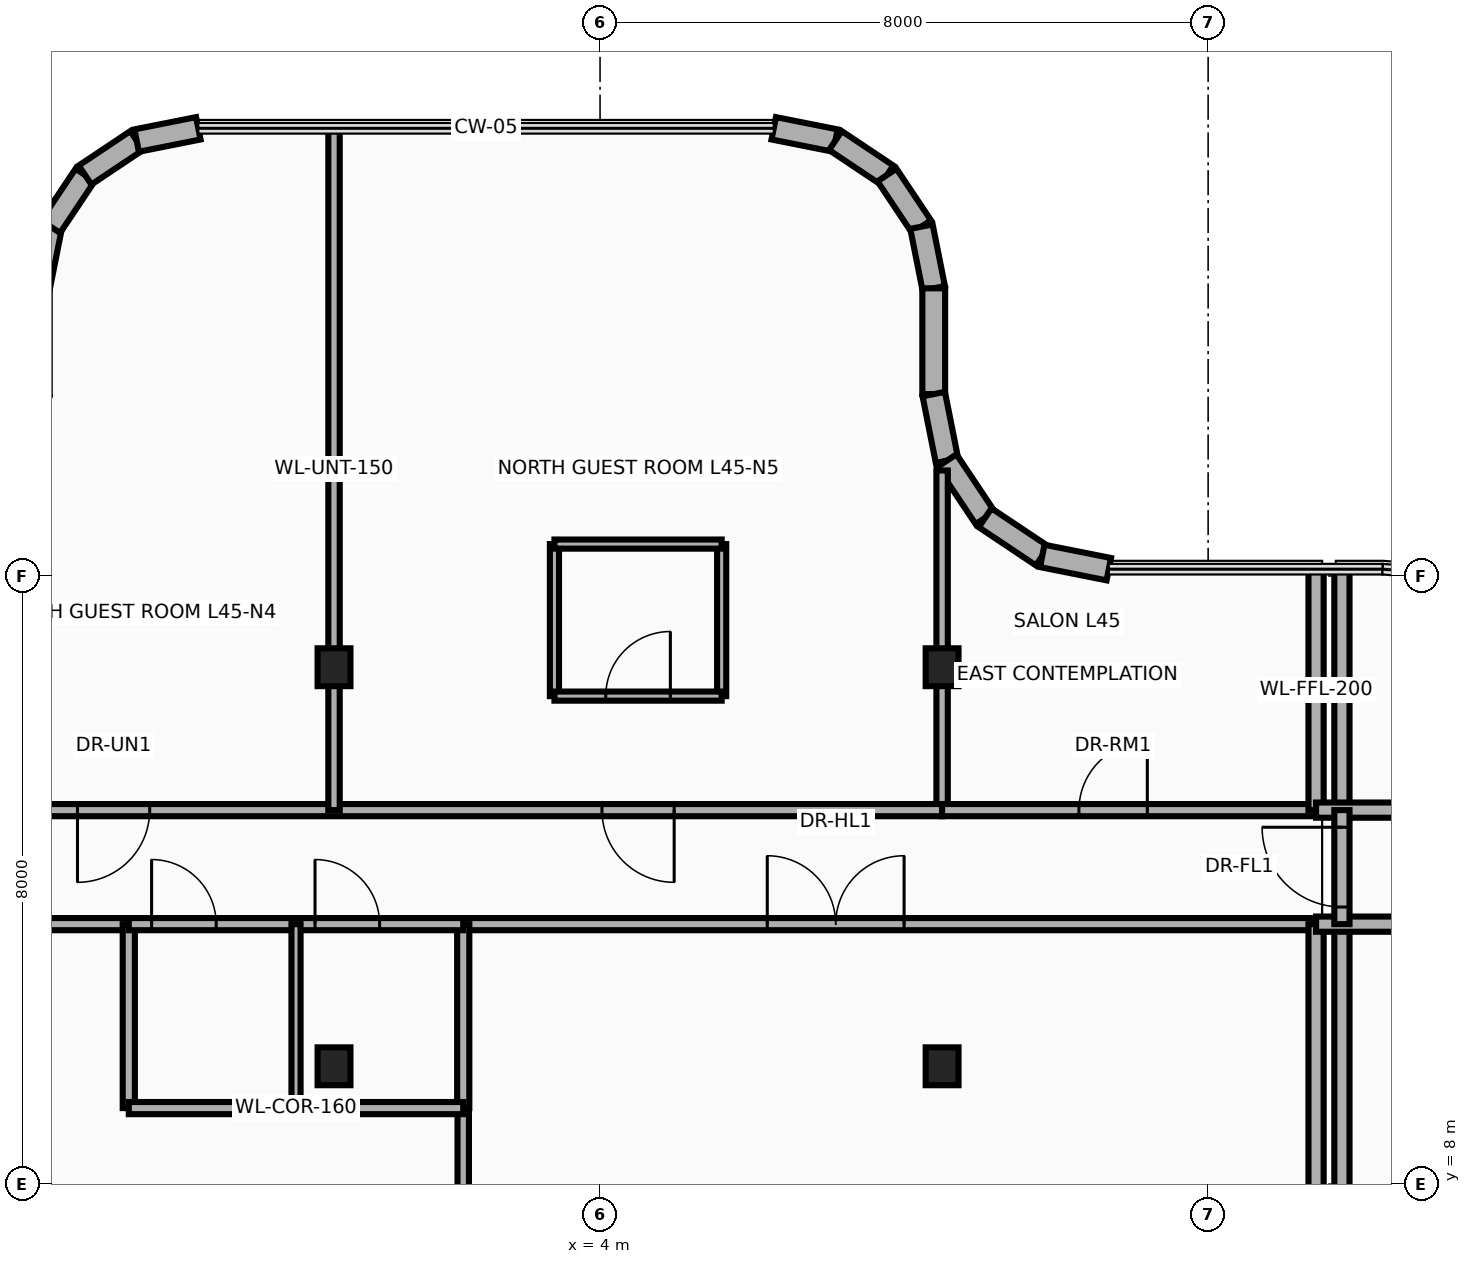
"""IFC4 building model, lengths in metres.
Left out: names, types, materials, properties, quantities, classifications, styles, units other than length and angle.
Written with IfcOpenShell. Run it as: python <this file> out.ifc"""

import sys

from ifc_helpers import new_model, si_unit, direction, frame, frame_2d, origin, origin_2d, place, context, subcontext, project, spatial, rectangle, i_section, extrude, source, transform, mapped, element, fill, save


model = new_model("IFC4")
c1 = context("Model", 3, precision=1e-05, world=origin(), true_north=direction((0.0, 1.0)))
c2 = subcontext(c1, "Body", "Model", "MODEL_VIEW")
j1 = project(units=[si_unit("LENGTHUNIT", "METRE"), si_unit("PLANEANGLEUNIT", "RADIAN")], contexts=[c1])
p1 = place(None, origin())
s1 = spatial("IfcSite", under=j1, at=p1, CompositionType="ELEMENT")
p2 = place(p1, origin())
s2 = spatial("IfcBuilding", under=s1, at=p2, CompositionType="ELEMENT")
p3 = place(p2, frame((0.0, 0.0, 176.55)))
s3 = spatial("IfcBuildingStorey", under=s2, at=p3, CompositionType="ELEMENT", Elevation=176.55)
m1 = source(origin(), c2, "Body", "SweptSolid", [
    extrude(i_section(OverallWidth=0.432, OverallDepth=0.498, WebThickness=0.056, FlangeThickness=0.089, at=origin_2d()), origin(), (0.0, 0.0, 1.0), 3.95),
])
for number, where, z_axis, x_axis in (
    (1, (8.5, 9.55, 0.0), (0.0, 0.0, 1.0), (1.0, 0.0, 0.0)),
    (2, (8.5, 14.8, 0.0), (0.0, 0.0, 1.0), (1.0, 0.0, 0.0)),
    (3, (0.5, 9.55, 0.0), (0.0, 0.0, 1.0), (1.0, 0.0, 0.0)),
    (4, (0.5, 14.8, 0.0), (0.0, 0.0, 1.0), (1.0, 0.0, 0.0)),
):
    element("IfcColumn", number, at=place(p3, frame(where, z_axis=z_axis, x_axis=x_axis)), inside=s3, PredefinedType="COLUMN", context=c2, shape_type="MappedRepresentation", body=[
        mapped(m1, transform((0.0, 0.0, 0.0), x_axis=(1.0, 0.0, 0.0), y_axis=(0.0, 1.0, 0.0), z_axis=(0.0, 0.0, 1.0), scale=1.0)),
    ])
p4 = place(p3, frame((-3.39, 19.785, 0.0), z_axis=(0.0, 0.0, 1.0), x_axis=(0.195094354541, 0.980784478276, 0.0)))
e5 = element("IfcWall", 5, at=p4, inside=s3, PredefinedType="SOLIDWALL", context=c2, shape_type="SweptSolid", body=[
    extrude(rectangle(XDim=0.827, YDim=0.3, at=frame_2d((0.414, 0.0))), origin(), (0.0, 0.0, 1.0), 2.615),
])
p5 = place(p3, frame((-3.229, 20.596, 0.0), z_axis=(0.0, 0.0, 1.0), x_axis=(0.55545926088, 0.831543750805, 0.0)))
e6 = element("IfcWall", 6, at=p5, inside=s3, PredefinedType="SOLIDWALL", context=c2, shape_type="SweptSolid", body=[
    extrude(rectangle(XDim=0.816, YDim=0.3, at=frame_2d((0.408, 0.0))), origin(), (0.0, 0.0, 1.0), 2.615),
])
p6 = place(p3, frame((-2.775, 21.275, 0.0), z_axis=(0.0, 0.0, 1.0), x_axis=(0.831543750805, 0.55545926088, 0.0)))
e7 = element("IfcWall", 7, at=p6, inside=s3, PredefinedType="SOLIDWALL", context=c2, shape_type="SweptSolid", body=[
    extrude(rectangle(XDim=0.816, YDim=0.3, at=frame_2d((0.408, 0.0))), origin(), (0.0, 0.0, 1.0), 3.63),
])
for number, where, z_axis, x_axis in (
    (8, (-2.096, 21.729, 0.0), (0.0, 0.0, 1.0), (0.981, 0.195, 0.0)),
    (9, (6.285, 21.89, 0.0), (0.0, 0.0, 1.0), (0.981, -0.195, 0.0)),
):
    element("IfcWall", number, at=place(p3, frame(where, z_axis=z_axis, x_axis=x_axis)), inside=s3, PredefinedType="SOLIDWALL", context=c2, shape_type="SweptSolid", body=[
        extrude(rectangle(XDim=0.827, YDim=0.3, at=frame_2d((0.414, 0.0))), origin(), (0.0, 0.0, 1.0), 3.076),
    ])
p7 = place(p3, frame((7.096, 21.729, 0.0), z_axis=(0.0, 0.0, 1.0), x_axis=(0.831543750805, -0.55545926088, 0.0)))
e10 = element("IfcWall", 10, at=p7, inside=s3, PredefinedType="SOLIDWALL", context=c2, shape_type="SweptSolid", body=[
    extrude(rectangle(XDim=0.816, YDim=0.3, at=frame_2d((0.408, 0.0))), origin(), (0.0, 0.0, 1.0), 3.63),
])
p8 = place(p3, frame((7.775, 21.275, 0.0), z_axis=(0.0, 0.0, 1.0), x_axis=(0.55545926088, -0.831543750805, 0.0)))
e11 = element("IfcWall", 11, at=p8, inside=s3, PredefinedType="SOLIDWALL", context=c2, shape_type="SweptSolid", body=[
    extrude(rectangle(XDim=0.816, YDim=0.3, at=frame_2d((0.408, 0.0))), origin(), (0.0, 0.0, 1.0), 2.615),
])
p9 = place(p3, frame((8.229, 20.596, 0.0), z_axis=(0.0, 0.0, 1.0), x_axis=(0.195094354541, -0.980784478276, 0.0)))
e12 = element("IfcWall", 12, at=p9, inside=s3, PredefinedType="SOLIDWALL", context=c2, shape_type="SweptSolid", body=[
    extrude(rectangle(XDim=0.827, YDim=0.3, at=frame_2d((0.414, 0.0))), origin(), (0.0, 0.0, 1.0), 2.615),
])
p10 = place(p3, frame((8.39, 19.785, 0.0), z_axis=(0.0, 0.0, 1.0), x_axis=(0.0, -1.0, 0.0)))
e13 = element("IfcWall", 13, at=p10, inside=s3, PredefinedType="SOLIDWALL", context=c2, shape_type="SweptSolid", body=[
    extrude(rectangle(XDim=1.392, YDim=0.3, at=frame_2d((0.696, 0.0))), origin(), (0.0, 0.0, 1.0), 2.615),
])
p11 = place(p3, frame((8.39, 18.393, 0.0), z_axis=(0.0, 0.0, 1.0), x_axis=(0.195222179208, -0.980759043163, 0.0)))
e14 = element("IfcWall", 14, at=p11, inside=s3, PredefinedType="SOLIDWALL", context=c2, shape_type="SweptSolid", body=[
    extrude(rectangle(XDim=0.893, YDim=0.3, at=frame_2d((0.446, 0.0))), origin(), (0.0, 0.0, 1.0), 2.615),
])
for number, where, z_axis, x_axis in (
    (15, (8.564, 17.518, 0.0), (0.0, 0.0, 1.0), (0.555, -0.832, 0.0)),
    (16, (9.066, 16.766, 0.0), (0.0, 0.0, 1.0), (0.832, -0.555, 0.0)),
):
    element("IfcWall", number, at=place(p3, frame(where, z_axis=z_axis, x_axis=x_axis)), inside=s3, PredefinedType="SOLIDWALL", context=c2, shape_type="SweptSolid", body=[
        extrude(rectangle(XDim=0.904, YDim=0.3, at=frame_2d((0.452, 0.0))), origin(), (0.0, 0.0, 1.0), 2.615),
    ])
p12 = place(p3, frame((9.818, 16.264, 0.0), z_axis=(0.0, 0.0, 1.0), x_axis=(0.980800964186, -0.195011457743, 0.0)))
e17 = element("IfcWall", 17, at=p12, inside=s3, PredefinedType="SOLIDWALL", context=c2, shape_type="SweptSolid", body=[
    extrude(rectangle(XDim=0.893, YDim=0.3, at=frame_2d((0.446, 0.0))), origin(), (0.0, 0.0, 1.0), 3.63),
])
p13 = place(p3, frame((8.5, 12.92, 0.0), z_axis=(0.0, 0.0, 1.0), x_axis=(0.0, 1.0, 0.0)))
e18 = element("IfcWall", 18, at=p13, inside=s3, PredefinedType="PARTITIONING", context=c2, shape_type="SweptSolid", body=[
    extrude(rectangle(XDim=4.469, YDim=0.15, at=frame_2d((2.234, 0.0))), origin(), (0.0, 0.0, 1.0), 2.615),
])
p14 = place(p3, frame((-28.25, 12.92, 0.0), z_axis=(0.0, 0.0, 1.0), x_axis=(1.0, 0.0, 0.0)))
e19 = element("IfcWall", 19, at=p14, inside=s3, PredefinedType="PARTITIONING", context=c2, shape_type="SweptSolid", body=[
    extrude(rectangle(XDim=36.75, YDim=0.16, at=frame_2d((18.375, 0.0))), origin(), (0.0, 0.0, 1.0), 2.615),
])
p15 = place(p14, frame((2.75, 0.0, 0.0)))
e20 = element("IfcOpeningElement", 20, at=p15, cuts=e19, PredefinedType="OPENING", context=c2, shape_type="SweptSolid", body=[
    extrude(rectangle(XDim=0.95, YDim=2.15, at=frame_2d((0.475, 1.075))), frame((0.0, 0.095, 0.0), z_axis=(0.0, -1.0, 0.0), x_axis=(1.0, 0.0, 0.0)), (0.0, 0.0, 1.0), 0.19),
])
p16 = place(p14, frame((8.025, 0.0, 0.0)))
e21 = element("IfcOpeningElement", 21, at=p16, cuts=e19, PredefinedType="OPENING", context=c2, shape_type="SweptSolid", body=[
    extrude(rectangle(XDim=0.95, YDim=2.15, at=frame_2d((0.475, 1.075))), frame((0.0, 0.095, 0.0), z_axis=(0.0, -1.0, 0.0), x_axis=(1.0, 0.0, 0.0)), (0.0, 0.0, 1.0), 0.19),
])
p17 = place(p14, frame((15.175, 0.0, 0.0)))
e22 = element("IfcOpeningElement", 22, at=p17, cuts=e19, PredefinedType="OPENING", context=c2, shape_type="SweptSolid", body=[
    extrude(rectangle(XDim=0.95, YDim=2.15, at=frame_2d((0.475, 1.075))), frame((0.0, 0.095, 0.0), z_axis=(0.0, -1.0, 0.0), x_axis=(1.0, 0.0, 0.0)), (0.0, 0.0, 1.0), 0.19),
])
p18 = place(p14, frame((25.375, 0.0, 0.0)))
e23 = element("IfcOpeningElement", 23, at=p18, cuts=e19, PredefinedType="OPENING", context=c2, shape_type="SweptSolid", body=[
    extrude(rectangle(XDim=0.95, YDim=2.15, at=frame_2d((0.475, 1.075))), frame((0.0, 0.095, 0.0), z_axis=(0.0, -1.0, 0.0), x_axis=(1.0, 0.0, 0.0)), (0.0, 0.0, 1.0), 0.19),
])
p19 = place(p14, frame((32.275, 0.0, 0.0)))
e24 = element("IfcOpeningElement", 24, at=p19, cuts=e19, PredefinedType="OPENING", context=c2, shape_type="SweptSolid", body=[
    extrude(rectangle(XDim=0.95, YDim=2.15, at=frame_2d((0.475, 1.075))), frame((0.0, 0.095, 0.0), z_axis=(0.0, -1.0, 0.0), x_axis=(1.0, 0.0, 0.0)), (0.0, 0.0, 1.0), 0.19),
])
p20 = place(p3, frame((0.5, 12.92, 0.0), z_axis=(0.0, 0.0, 1.0), x_axis=(0.0, 1.0, 0.0)))
e25 = element("IfcWall", 25, at=p20, inside=s3, PredefinedType="PARTITIONING", context=c2, shape_type="SweptSolid", body=[
    extrude(rectangle(XDim=8.97, YDim=0.15, at=frame_2d((4.485, 0.0))), origin(), (0.0, 0.0, 1.0), 2.665),
])
for number, where, z_axis, x_axis in (
    (26, (3.4, 14.42, 0.0), (0.0, 0.0, 1.0), (0.0, 1.0, 0.0)),
    (27, (5.6, 14.42, 0.0), (0.0, 0.0, 1.0), (0.0, 1.0, 0.0)),
):
    element("IfcWall", number, at=place(p3, frame(where, z_axis=z_axis, x_axis=x_axis)), inside=s3, PredefinedType="PARTITIONING", context=c2, shape_type="SweptSolid", body=[
        extrude(rectangle(XDim=2.0, YDim=0.12, at=frame_2d((1.0, 0.0))), origin(), (0.0, 0.0, 1.0), 2.665),
    ])
p21 = place(p3, frame((3.4, 16.42, 0.0), z_axis=(0.0, 0.0, 1.0), x_axis=(1.0, 0.0, 0.0)))
e28 = element("IfcWall", 28, at=p21, inside=s3, PredefinedType="PARTITIONING", context=c2, shape_type="SweptSolid", body=[
    extrude(rectangle(XDim=2.2, YDim=0.12, at=frame_2d((1.1, 0.0))), origin(), (0.0, 0.0, 1.0), 3.63),
])
p22 = place(p3, frame((3.4, 14.42, 0.0), z_axis=(0.0, 0.0, 1.0), x_axis=(1.0, 0.0, 0.0)))
e29 = element("IfcWall", 29, at=p22, inside=s3, PredefinedType="PARTITIONING", context=c2, shape_type="SweptSolid", body=[
    extrude(rectangle(XDim=2.2, YDim=0.12, at=frame_2d((1.1, 0.0))), origin(), (0.0, 0.0, 1.0), 3.63),
])
p23 = place(p22, frame((0.675, 0.0, 0.0)))
e30 = element("IfcOpeningElement", 30, at=p23, cuts=e29, PredefinedType="OPENING", context=c2, shape_type="SweptSolid", body=[
    extrude(rectangle(XDim=0.85, YDim=2.1, at=frame_2d((0.425, 1.05))), frame((0.0, 0.075, 0.0), z_axis=(0.0, -1.0, 0.0), x_axis=(1.0, 0.0, 0.0)), (0.0, 0.0, 1.0), 0.15),
])
p24 = place(p3, frame((-10.05, 11.42, 0.0), z_axis=(0.0, 0.0, 1.0), x_axis=(1.0, 0.0, 0.0)))
e31 = element("IfcWall", 31, at=p24, inside=s3, PredefinedType="PARTITIONING", context=c2, shape_type="SweptSolid", body=[
    extrude(rectangle(XDim=7.85, YDim=0.16, at=frame_2d((3.925, 0.0))), origin(), (0.0, 0.0, 1.0), 2.615),
])
p25 = place(p3, frame((2.2, 11.42, 0.0), z_axis=(0.0, 0.0, 1.0), x_axis=(1.0, 0.0, 0.0)))
e32 = element("IfcWall", 32, at=p25, inside=s3, PredefinedType="PARTITIONING", context=c2, shape_type="SweptSolid", body=[
    extrude(rectangle(XDim=11.22, YDim=0.16, at=frame_2d((5.61, 0.0))), origin(), (0.0, 0.0, 1.0), 2.615),
])
p26 = place(p25, frame((4.0, 0.0, 0.0)))
e33 = element("IfcOpeningElement", 33, at=p26, cuts=e32, PredefinedType="OPENING", context=c2, shape_type="SweptSolid", body=[
    extrude(rectangle(XDim=1.8, YDim=2.15, at=frame_2d((0.9, 1.075))), frame((0.0, 0.095, 0.0), z_axis=(0.0, -1.0, 0.0), x_axis=(1.0, 0.0, 0.0)), (0.0, 0.0, 1.0), 0.19),
])
for number, where, z_axis, x_axis in (
    (34, (13.42, -2.0, 0.0), (0.0, 0.0, 1.0), (0.0, 1.0, 0.0)),
    (35, (13.76, -2.0, 0.0), (0.0, 0.0, 1.0), (0.0, 1.0, 0.0)),
):
    element("IfcWall", number, at=place(p3, frame(where, z_axis=z_axis, x_axis=x_axis)), inside=s3, PredefinedType="PARTITIONING", context=c2, shape_type="SweptSolid", body=[
        extrude(rectangle(XDim=13.42, YDim=0.2, at=frame_2d((6.71, 0.0))), origin(), (0.0, 0.0, 1.0), 2.665),
    ])
p27 = place(p3, frame((2.2, -7.09, 0.0), z_axis=(0.0, 0.0, 1.0), x_axis=(0.0, 1.0, 0.0)))
e36 = element("IfcWall", 36, at=p27, inside=s3, PredefinedType="PARTITIONING", context=c2, shape_type="SweptSolid", body=[
    extrude(rectangle(XDim=16.09, YDim=0.15, at=frame_2d((8.045, 0.0))), origin(), (0.0, 0.0, 1.0), 2.665),
])
p28 = place(p27, frame((11.5, 0.0, 0.0)))
e37 = element("IfcOpeningElement", 37, at=p28, cuts=e36, PredefinedType="OPENING", context=c2, shape_type="SweptSolid", body=[
    extrude(rectangle(XDim=0.9, YDim=2.1, at=frame_2d((0.45, 1.05))), frame((0.0, 0.09, 0.0), z_axis=(0.0, -1.0, 0.0), x_axis=(1.0, 0.0, 0.0)), (0.0, 0.0, 1.0), 0.18),
])
for number, where, z_axis, x_axis in (
    (38, (-2.2, 9.0, 0.0), (0.0, 0.0, 1.0), (0.0, 1.0, 0.0)),
    (39, (2.2, 9.0, 0.0), (0.0, 0.0, 1.0), (0.0, 1.0, 0.0)),
):
    element("IfcWall", number, at=place(p3, frame(where, z_axis=z_axis, x_axis=x_axis)), inside=s3, PredefinedType="PARTITIONING", context=c2, shape_type="SweptSolid", body=[
        extrude(rectangle(XDim=2.42, YDim=0.16, at=frame_2d((1.21, 0.0))), origin(), (0.0, 0.0, 1.0), 2.665),
    ])
p29 = place(p3, frame((-2.2, 9.0, 0.0), z_axis=(0.0, 0.0, 1.0), x_axis=(1.0, 0.0, 0.0)))
e40 = element("IfcWall", 40, at=p29, inside=s3, PredefinedType="PARTITIONING", context=c2, shape_type="SweptSolid", body=[
    extrude(rectangle(XDim=4.4, YDim=0.16, at=frame_2d((2.2, 0.0))), origin(), (0.0, 0.0, 1.0), 3.63),
])
p30 = place(p3, frame((-2.2, 11.42, 0.0), z_axis=(0.0, 0.0, 1.0), x_axis=(1.0, 0.0, 0.0)))
e41 = element("IfcWall", 41, at=p30, inside=s3, PredefinedType="PARTITIONING", context=c2, shape_type="SweptSolid", body=[
    extrude(rectangle(XDim=4.4, YDim=0.16, at=frame_2d((2.2, 0.0))), origin(), (0.0, 0.0, 1.0), 3.63),
])
p31 = place(p30, frame((0.3, 0.0, 0.0)))
e42 = element("IfcOpeningElement", 42, at=p31, cuts=e41, PredefinedType="OPENING", context=c2, shape_type="SweptSolid", body=[
    extrude(rectangle(XDim=0.85, YDim=2.1, at=frame_2d((0.425, 1.05))), frame((0.0, 0.095, 0.0), z_axis=(0.0, -1.0, 0.0), x_axis=(1.0, 0.0, 0.0)), (0.0, 0.0, 1.0), 0.19),
])
p32 = place(p30, frame((2.45, 0.0, 0.0)))
e43 = element("IfcOpeningElement", 43, at=p32, cuts=e41, PredefinedType="OPENING", context=c2, shape_type="SweptSolid", body=[
    extrude(rectangle(XDim=0.85, YDim=2.1, at=frame_2d((0.425, 1.05))), frame((0.0, 0.095, 0.0), z_axis=(0.0, -1.0, 0.0), x_axis=(1.0, 0.0, 0.0)), (0.0, 0.0, 1.0), 0.19),
])
p33 = place(p3, frame((0.0, 9.0, 0.0), z_axis=(0.0, 0.0, 1.0), x_axis=(0.0, 1.0, 0.0)))
e44 = element("IfcWall", 44, at=p33, inside=s3, PredefinedType="PARTITIONING", context=c2, shape_type="SweptSolid", body=[
    extrude(rectangle(XDim=2.42, YDim=0.12, at=frame_2d((1.21, 0.0))), origin(), (0.0, 0.0, 1.0), 2.665),
])
p34 = place(p3, frame((8.5, 12.92, 0.0), z_axis=(0.0, 0.0, 1.0), x_axis=(1.0, 0.0, 0.0)))
e45 = element("IfcWall", 45, at=p34, inside=s3, PredefinedType="PARTITIONING", context=c2, shape_type="SweptSolid", body=[
    extrude(rectangle(XDim=4.92, YDim=0.16, at=frame_2d((2.46, 0.0))), origin(), (0.0, 0.0, 1.0), 2.615),
])
p35 = place(p34, frame((1.8, 0.0, 0.0)))
e46 = element("IfcOpeningElement", 46, at=p35, cuts=e45, PredefinedType="OPENING", context=c2, shape_type="SweptSolid", body=[
    extrude(rectangle(XDim=0.9, YDim=2.1, at=frame_2d((0.45, 1.05))), frame((0.0, 0.095, 0.0), z_axis=(0.0, -1.0, 0.0), x_axis=(1.0, 0.0, 0.0)), (0.0, 0.0, 1.0), 0.19),
])
for number, where, z_axis, x_axis in (
    (47, (13.42, 12.92, 0.0), (0.0, 0.0, 1.0), (0.0, 1.0, 0.0)),
    (48, (13.76, 12.92, 0.0), (0.0, 0.0, 1.0), (0.0, 1.0, 0.0)),
):
    element("IfcWall", number, at=place(p3, frame(where, z_axis=z_axis, x_axis=x_axis)), inside=s3, PredefinedType="PARTITIONING", context=c2, shape_type="SweptSolid", body=[
        extrude(rectangle(XDim=3.17, YDim=0.2, at=frame_2d((1.585, 0.0))), origin(), (0.0, 0.0, 1.0), 2.665),
    ])
for number, where, z_axis, x_axis in (
    (49, (13.42, 12.92, 0.0), (0.0, 0.0, 1.0), (1.0, 0.0, 0.0)),
    (50, (13.42, 11.42, 0.0), (0.0, 0.0, 1.0), (1.0, 0.0, 0.0)),
):
    element("IfcWall", number, at=place(p3, frame(where, z_axis=z_axis, x_axis=x_axis)), inside=s3, PredefinedType="PARTITIONING", context=c2, shape_type="SweptSolid", body=[
        extrude(rectangle(XDim=1.98, YDim=0.2, at=frame_2d((0.99, 0.0))), origin(), (0.0, 0.0, 1.0), 3.004),
    ])
p36 = place(p3, frame((13.76, 11.42, 0.0), z_axis=(0.0, 0.0, 1.0), x_axis=(0.0, 1.0, 0.0)))
e51 = element("IfcWall", 51, at=p36, inside=s3, PredefinedType="PARTITIONING", context=c2, shape_type="SweptSolid", body=[
    extrude(rectangle(XDim=1.5, YDim=0.2, at=frame_2d((0.75, 0.0))), origin(), (0.0, 0.0, 1.0), 3.004),
])
p37 = place(p36, frame((0.225, 0.0, 0.0)))
e52 = element("IfcOpeningElement", 52, at=p37, cuts=e51, PredefinedType="OPENING", context=c2, shape_type="SweptSolid", body=[
    extrude(rectangle(XDim=1.05, YDim=2.15, at=frame_2d((0.525, 1.075))), frame((0.0, 0.115, 0.0), z_axis=(0.0, -1.0, 0.0), x_axis=(1.0, 0.0, 0.0)), (0.0, 0.0, 1.0), 0.23),
])
p38 = place(p18, frame((0.95, 0.0, 0.0), z_axis=(0.0, 0.0, 1.0), x_axis=(-1.0, 0.0, 0.0)))
e53 = element("IfcDoor", 53, at=p38, inside=s3, OperationType="SINGLE_SWING_LEFT", PredefinedType="DOOR", context=c2, shape_type="SweptSolid", body=[
    extrude(rectangle(XDim=0.95, YDim=2.15, at=frame_2d((0.475, 1.075))), frame((0.0, 0.025, 0.0), z_axis=(0.0, -1.0, 0.0), x_axis=(1.0, 0.0, 0.0)), (0.0, 0.0, 1.0), 0.05),
])
fill(e23, e53)
p39 = place(p19, frame((0.95, 0.0, 0.0), z_axis=(0.0, 0.0, 1.0), x_axis=(-1.0, 0.0, 0.0)))
e54 = element("IfcDoor", 54, at=p39, inside=s3, OperationType="SINGLE_SWING_LEFT", PredefinedType="DOOR", context=c2, shape_type="SweptSolid", body=[
    extrude(rectangle(XDim=0.95, YDim=2.15, at=frame_2d((0.475, 1.075))), frame((0.0, 0.025, 0.0), z_axis=(0.0, -1.0, 0.0), x_axis=(1.0, 0.0, 0.0)), (0.0, 0.0, 1.0), 0.05),
])
fill(e24, e54)
p40 = place(p23, origin())
e55 = element("IfcDoor", 55, at=p40, inside=s3, OperationType="SINGLE_SWING_RIGHT", PredefinedType="DOOR", context=c2, shape_type="SweptSolid", body=[
    extrude(rectangle(XDim=0.85, YDim=2.1, at=frame_2d((0.425, 1.05))), frame((0.0, 0.025, 0.0), z_axis=(0.0, -1.0, 0.0), x_axis=(1.0, 0.0, 0.0)), (0.0, 0.0, 1.0), 0.05),
])
fill(e30, e55)
p41 = place(p26, origin())
e56 = element("IfcDoor", 56, at=p41, inside=s3, OperationType="DOUBLE_DOOR_SINGLE_SWING", PredefinedType="DOOR", context=c2, shape_type="SweptSolid", body=[
    extrude(rectangle(XDim=1.8, YDim=2.15, at=frame_2d((0.9, 1.075))), frame((0.0, 0.025, 0.0), z_axis=(0.0, -1.0, 0.0), x_axis=(1.0, 0.0, 0.0)), (0.0, 0.0, 1.0), 0.05),
])
fill(e33, e56)
p42 = place(p31, origin())
e57 = element("IfcDoor", 57, at=p42, inside=s3, OperationType="SINGLE_SWING_RIGHT", PredefinedType="DOOR", context=c2, shape_type="SweptSolid", body=[
    extrude(rectangle(XDim=0.85, YDim=2.1, at=frame_2d((0.425, 1.05))), frame((0.0, 0.025, 0.0), z_axis=(0.0, -1.0, 0.0), x_axis=(1.0, 0.0, 0.0)), (0.0, 0.0, 1.0), 0.05),
])
fill(e42, e57)
p43 = place(p32, origin())
e58 = element("IfcDoor", 58, at=p43, inside=s3, OperationType="SINGLE_SWING_LEFT", PredefinedType="DOOR", context=c2, shape_type="SweptSolid", body=[
    extrude(rectangle(XDim=0.85, YDim=2.1, at=frame_2d((0.425, 1.05))), frame((0.0, 0.025, 0.0), z_axis=(0.0, -1.0, 0.0), x_axis=(1.0, 0.0, 0.0)), (0.0, 0.0, 1.0), 0.05),
])
fill(e43, e58)
p44 = place(p35, origin())
e59 = element("IfcDoor", 59, at=p44, inside=s3, OperationType="SINGLE_SWING_RIGHT", PredefinedType="DOOR", context=c2, shape_type="SweptSolid", body=[
    extrude(rectangle(XDim=0.9, YDim=2.1, at=frame_2d((0.45, 1.05))), frame((0.0, 0.025, 0.0), z_axis=(0.0, -1.0, 0.0), x_axis=(1.0, 0.0, 0.0)), (0.0, 0.0, 1.0), 0.05),
])
fill(e46, e59)
p45 = place(p37, origin())
e60 = element("IfcDoor", 60, at=p45, inside=s3, OperationType="SINGLE_SWING_LEFT", PredefinedType="DOOR", context=c2, shape_type="SweptSolid", body=[
    extrude(rectangle(XDim=1.05, YDim=2.15, at=frame_2d((0.525, 1.075))), frame((0.0, 0.025, 0.0), z_axis=(0.0, -1.0, 0.0), x_axis=(1.0, 0.0, 0.0)), (0.0, 0.0, 1.0), 0.05),
])
fill(e52, e60)
save(model, sys.argv[1])
